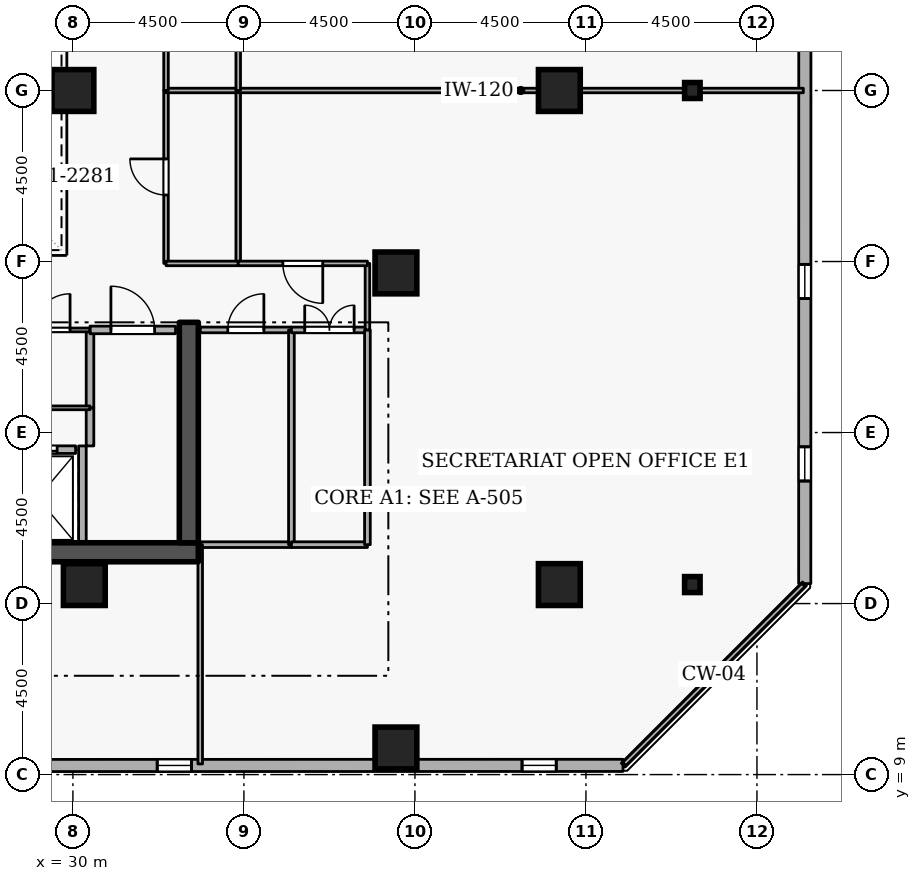
"""IFC4 building model, lengths in metres.
Left out: names, types, materials, properties, quantities, classifications, styles, units other than length and angle.
Written with IfcOpenShell. Run it as: python <this file> out.ifc"""

import sys

from ifc_helpers import new_model, si_unit, direction, frame, frame_2d, origin, origin_2d, place, context, subcontext, project, spatial, rectangle, i_section, extrude, element, fill, save


model = new_model("IFC4")
c1 = context("Model", 3, precision=1e-05, world=origin(), true_north=direction((0.0, 1.0)))
c2 = subcontext(c1, "Body", "Model", "MODEL_VIEW")
j1 = project(units=[si_unit("LENGTHUNIT", "METRE"), si_unit("PLANEANGLEUNIT", "RADIAN")], contexts=[c1])
p1 = place(None, origin())
s1 = spatial("IfcSite", under=j1, at=p1, CompositionType="ELEMENT")
p2 = place(p1, origin())
s2 = spatial("IfcBuilding", under=s1, at=p2, CompositionType="ELEMENT")
p3 = place(p2, frame((0.0, 0.0, 192.9)))
s3 = spatial("IfcBuildingStorey", under=s2, at=p3, CompositionType="ELEMENT", Elevation=192.9)
p4 = place(p3, frame((17.7, 14.85, 0.0), z_axis=(0.0, 0.0, 1.0), x_axis=(1.0, 0.0, 0.0)))
e1 = element("IfcWall", 1, at=p4, inside=s3, PredefinedType="SHEAR", context=c2, shape_type="SweptSolid", body=[
    extrude(rectangle(XDim=15.6, YDim=0.5, at=frame_2d((7.8, 0.0))), origin(), (0.0, 0.0, 1.0), 3.6),
])
p5 = place(p3, frame((33.05, 15.1, 0.0), z_axis=(0.0, 0.0, 1.0), x_axis=(0.0, 1.0, 0.0)))
e2 = element("IfcWall", 2, at=p5, inside=s3, PredefinedType="SHEAR", context=c2, shape_type="SweptSolid", body=[
    extrude(rectangle(XDim=5.8, YDim=0.5, at=frame_2d((2.9, 0.0))), origin(), (0.0, 0.0, 1.0), 3.6),
])
for number, where, z_axis, x_axis in (
    (3, (38.5, 9.7, 0.0), (0.0, 0.0, 1.0), (1.0, 0.0, 0.0)),
    (4, (42.8, 14.0, 0.0), (0.0, 0.0, 1.0), (1.0, 0.0, 0.0)),
    (5, (42.8, 27.0, 0.0), (0.0, 0.0, 1.0), (1.0, 0.0, 0.0)),
    (6, (38.5, 22.2, 0.0), (0.0, 0.0, 1.0), (1.0, 0.0, 0.0)),
    (7, (30.3, 14.0, 0.0), (0.0, 0.0, 1.0), (1.0, 0.0, 0.0)),
    (8, (30.0, 27.0, 0.0), (0.0, 0.0, 1.0), (1.0, 0.0, 0.0)),
):
    element("IfcColumn", number, at=place(p3, frame(where, z_axis=z_axis, x_axis=x_axis)), inside=s3, PredefinedType="COLUMN", context=c2, shape_type="SweptSolid", body=[
        extrude(rectangle(XDim=1.1, YDim=1.1, at=origin_2d()), origin(), (0.0, 0.0, 1.0), 3.6),
    ])
for number, where, z_axis, x_axis in (
    (9, (46.3, 14.0, 0.0), (0.0, 0.0, 1.0), (1.0, 0.0, 0.0)),
    (10, (46.3, 27.0, 0.0), (0.0, 0.0, 1.0), (1.0, 0.0, 0.0)),
):
    element("IfcColumn", number, at=place(p3, frame(where, z_axis=z_axis, x_axis=x_axis)), inside=s3, PredefinedType="COLUMN", context=c2, shape_type="SweptSolid", body=[
        extrude(i_section(OverallWidth=0.407, OverallDepth=0.419, WebThickness=0.031, FlangeThickness=0.049, FilletRadius=0.015, at=origin_2d()), origin(), (0.0, 0.0, 1.0), 3.6),
    ])
p6 = place(p3, frame((10.319, 9.235, 0.0), z_axis=(0.0, 0.0, 1.0), x_axis=(0.99999997701, 0.000214431216, 0.0)))
e11 = element("IfcWall", 11, at=p6, inside=s3, PredefinedType="STANDARD", context=c2, shape_type="SweptSolid", body=[
    extrude(rectangle(XDim=34.156, YDim=0.32, at=frame_2d((17.078, 0.0))), origin(), (0.0, 0.0, 1.0), 2.7),
])
p7 = place(p6, frame((7.5, 0.0, 0.72)))
e12 = element("IfcOpeningElement", 12, at=p7, cuts=e11, PredefinedType="OPENING", context=c2, shape_type="SweptSolid", body=[
    extrude(rectangle(XDim=0.9, YDim=1.75, at=frame_2d((0.45, 0.875))), frame((0.0, 0.17, 0.0), z_axis=(0.0, -1.0, 0.0), x_axis=(1.0, 0.0, 0.0)), (0.0, 0.0, 1.0), 0.34),
])
p8 = place(p6, frame((12.3, 0.0, 0.72)))
e13 = element("IfcOpeningElement", 13, at=p8, cuts=e11, PredefinedType="OPENING", context=c2, shape_type="SweptSolid", body=[
    extrude(rectangle(XDim=0.9, YDim=1.75, at=frame_2d((0.45, 0.875))), frame((0.0, 0.17, 0.0), z_axis=(0.0, -1.0, 0.0), x_axis=(1.0, 0.0, 0.0)), (0.0, 0.0, 1.0), 0.34),
])
p9 = place(p6, frame((17.1, 0.0, 0.72)))
e14 = element("IfcOpeningElement", 14, at=p9, cuts=e11, PredefinedType="OPENING", context=c2, shape_type="SweptSolid", body=[
    extrude(rectangle(XDim=0.9, YDim=1.75, at=frame_2d((0.45, 0.875))), frame((0.0, 0.17, 0.0), z_axis=(0.0, -1.0, 0.0), x_axis=(1.0, 0.0, 0.0)), (0.0, 0.0, 1.0), 0.34),
])
p10 = place(p6, frame((21.9, 0.0, 0.72)))
e15 = element("IfcOpeningElement", 15, at=p10, cuts=e11, PredefinedType="OPENING", context=c2, shape_type="SweptSolid", body=[
    extrude(rectangle(XDim=0.9, YDim=1.75, at=frame_2d((0.45, 0.875))), frame((0.0, 0.17, 0.0), z_axis=(0.0, -1.0, 0.0), x_axis=(1.0, 0.0, 0.0)), (0.0, 0.0, 1.0), 0.34),
])
p11 = place(p6, frame((31.5, 0.0, 0.72)))
e16 = element("IfcOpeningElement", 16, at=p11, cuts=e11, PredefinedType="OPENING", context=c2, shape_type="SweptSolid", body=[
    extrude(rectangle(XDim=0.9, YDim=1.75, at=frame_2d((0.45, 0.875))), frame((0.0, 0.17, 0.0), z_axis=(0.0, -1.0, 0.0), x_axis=(1.0, 0.0, 0.0)), (0.0, 0.0, 1.0), 0.34),
])
p12 = place(p3, frame((49.257, 14.025, 0.0), z_axis=(0.0, 0.0, 1.0), x_axis=(0.000214431216, 0.99999997701, 0.0)))
e17 = element("IfcWall", 17, at=p12, inside=s3, PredefinedType="STANDARD", context=c2, shape_type="SweptSolid", body=[
    extrude(rectangle(XDim=34.156, YDim=0.32, at=frame_2d((17.078, 0.0))), origin(), (0.0, 0.0, 1.0), 2.7),
])
p13 = place(p12, frame((2.7, 0.0, 0.72)))
e18 = element("IfcOpeningElement", 18, at=p13, cuts=e17, PredefinedType="OPENING", context=c2, shape_type="SweptSolid", body=[
    extrude(rectangle(XDim=0.9, YDim=1.75, at=frame_2d((0.45, 0.875))), frame((0.0, 0.17, 0.0), z_axis=(0.0, -1.0, 0.0), x_axis=(1.0, 0.0, 0.0)), (0.0, 0.0, 1.0), 0.34),
])
p14 = place(p12, frame((7.5, 0.0, 0.72)))
e19 = element("IfcOpeningElement", 19, at=p14, cuts=e17, PredefinedType="OPENING", context=c2, shape_type="SweptSolid", body=[
    extrude(rectangle(XDim=0.9, YDim=1.75, at=frame_2d((0.45, 0.875))), frame((0.0, 0.17, 0.0), z_axis=(0.0, -1.0, 0.0), x_axis=(1.0, 0.0, 0.0)), (0.0, 0.0, 1.0), 0.34),
])
p15 = place(p12, frame((17.1, 0.0, 0.72)))
e20 = element("IfcOpeningElement", 20, at=p15, cuts=e17, PredefinedType="OPENING", context=c2, shape_type="SweptSolid", body=[
    extrude(rectangle(XDim=0.9, YDim=1.75, at=frame_2d((0.45, 0.875))), frame((0.0, 0.17, 0.0), z_axis=(0.0, -1.0, 0.0), x_axis=(1.0, 0.0, 0.0)), (0.0, 0.0, 1.0), 0.34),
])
p16 = place(p12, frame((21.9, 0.0, 0.72)))
e21 = element("IfcOpeningElement", 21, at=p16, cuts=e17, PredefinedType="OPENING", context=c2, shape_type="SweptSolid", body=[
    extrude(rectangle(XDim=0.9, YDim=1.75, at=frame_2d((0.45, 0.875))), frame((0.0, 0.17, 0.0), z_axis=(0.0, -1.0, 0.0), x_axis=(1.0, 0.0, 0.0)), (0.0, 0.0, 1.0), 0.34),
])
p17 = place(p12, frame((26.7, 0.0, 0.72)))
e22 = element("IfcOpeningElement", 22, at=p17, cuts=e17, PredefinedType="OPENING", context=c2, shape_type="SweptSolid", body=[
    extrude(rectangle(XDim=0.9, YDim=1.75, at=frame_2d((0.45, 0.875))), frame((0.0, 0.17, 0.0), z_axis=(0.0, -1.0, 0.0), x_axis=(1.0, 0.0, 0.0)), (0.0, 0.0, 1.0), 0.34),
])
p18 = place(p12, frame((31.5, 0.0, 0.72)))
e23 = element("IfcOpeningElement", 23, at=p18, cuts=e17, PredefinedType="OPENING", context=c2, shape_type="SweptSolid", body=[
    extrude(rectangle(XDim=0.9, YDim=1.75, at=frame_2d((0.45, 0.875))), frame((0.0, 0.17, 0.0), z_axis=(0.0, -1.0, 0.0), x_axis=(1.0, 0.0, 0.0)), (0.0, 0.0, 1.0), 0.34),
])
p19 = place(p3, frame((28.08, 17.55, 0.0), z_axis=(0.0, 0.0, 1.0), x_axis=(1.0, 0.0, 0.0)))
e24 = element("IfcWall", 24, at=p19, inside=s3, PredefinedType="STANDARD", context=c2, shape_type="SweptSolid", body=[
    extrude(rectangle(XDim=1.99, YDim=0.2, at=frame_2d((0.995, 0.0))), origin(), (0.0, 0.0, 1.0), 3.34),
])
p20 = place(p19, frame((0.485, 0.0, 0.0)))
e25 = element("IfcOpeningElement", 25, at=p20, cuts=e24, PredefinedType="OPENING", context=c2, shape_type="SweptSolid", body=[
    extrude(rectangle(XDim=1.02, YDim=2.06, at=frame_2d((0.51, 1.03))), frame((0.0, 0.11, 0.0), z_axis=(0.0, -1.0, 0.0), x_axis=(1.0, 0.0, 0.0)), (0.0, 0.0, 1.0), 0.22),
])
p21 = place(p3, frame((30.25, 15.112, 0.0), z_axis=(0.0, 0.0, 1.0), x_axis=(0.0, 1.0, 0.0)))
e26 = element("IfcWall", 26, at=p21, inside=s3, PredefinedType="STANDARD", context=c2, shape_type="SweptSolid", body=[
    extrude(rectangle(XDim=2.536, YDim=0.2, at=frame_2d((1.268, 0.0))), origin(), (0.0, 0.0, 1.0), 3.34),
])
p22 = place(p3, frame((30.45, 17.648, 0.0), z_axis=(0.0, 0.0, 1.0), x_axis=(0.0, 1.0, 0.0)))
e27 = element("IfcWall", 27, at=p22, inside=s3, PredefinedType="STANDARD", context=c2, shape_type="SweptSolid", body=[
    extrude(rectangle(XDim=1.002, YDim=0.2, at=frame_2d((0.501, 0.0))), origin(), (0.0, 0.0, 1.0), 3.34),
])
p23 = place(p3, frame((30.45, 18.65, 0.0), z_axis=(0.0, 0.0, 1.0), x_axis=(0.0, 1.0, 0.0)))
e28 = element("IfcWall", 28, at=p23, inside=s3, PredefinedType="STANDARD", context=c2, shape_type="SweptSolid", body=[
    extrude(rectangle(XDim=2.05, YDim=0.2, at=frame_2d((1.025, 0.0))), origin(), (0.0, 0.0, 1.0), 3.34),
])
p24 = place(p3, frame((30.45, 20.7, 0.0), z_axis=(0.0, 0.0, 1.0), x_axis=(1.0, 0.0, 0.0)))
e29 = element("IfcWall", 29, at=p24, inside=s3, PredefinedType="STANDARD", context=c2, shape_type="SweptSolid", body=[
    extrude(rectangle(XDim=2.25, YDim=0.2, at=frame_2d((1.125, 0.0))), origin(), (0.0, 0.0, 1.0), 3.34),
])
p25 = place(p24, frame((0.55, 0.0, 0.0)))
e30 = element("IfcOpeningElement", 30, at=p25, cuts=e29, PredefinedType="OPENING", context=c2, shape_type="SweptSolid", body=[
    extrude(rectangle(XDim=1.15, YDim=2.1, at=frame_2d((0.575, 1.05))), frame((0.0, 0.11, 0.0), z_axis=(0.0, -1.0, 0.0), x_axis=(1.0, 0.0, 0.0)), (0.0, 0.0, 1.0), 0.22),
])
p26 = place(p3, frame((30.45, 18.65, 0.0), z_axis=(0.0, 0.0, 1.0), x_axis=(-1.0, 0.0, 0.0)))
e31 = element("IfcWall", 31, at=p26, inside=s3, PredefinedType="PARTITIONING", context=c2, shape_type="SweptSolid", body=[
    extrude(rectangle(XDim=2.0, YDim=0.1, at=frame_2d((1.0, 0.0))), origin(), (0.0, 0.0, 1.0), 3.34),
])
p27 = place(p3, frame((28.45, 20.7, 0.0), z_axis=(0.0, 0.0, 1.0), x_axis=(1.0, 0.0, 0.0)))
e32 = element("IfcWall", 32, at=p27, inside=s3, PredefinedType="PARTITIONING", context=c2, shape_type="SweptSolid", body=[
    extrude(rectangle(XDim=2.0, YDim=0.1, at=frame_2d((1.0, 0.0))), origin(), (0.0, 0.0, 1.0), 3.34),
])
p28 = place(p27, frame((0.525, 0.0, 0.0)))
e33 = element("IfcOpeningElement", 33, at=p28, cuts=e32, PredefinedType="OPENING", context=c2, shape_type="SweptSolid", body=[
    extrude(rectangle(XDim=0.95, YDim=2.1, at=frame_2d((0.475, 1.05))), frame((0.0, 0.06, 0.0), z_axis=(0.0, -1.0, 0.0), x_axis=(1.0, 0.0, 0.0)), (0.0, 0.0, 1.0), 0.12),
])
p29 = place(p3, frame((35.75, 15.05, 0.0), z_axis=(0.0, 0.0, 1.0), x_axis=(-1.0, 0.0, 0.0)))
e34 = element("IfcWall", 34, at=p29, inside=s3, PredefinedType="PARTITIONING", context=c2, shape_type="SweptSolid", body=[
    extrude(rectangle(XDim=2.4, YDim=0.15, at=frame_2d((1.2, 0.0))), origin(), (0.0, 0.0, 1.0), 3.34),
])
p30 = place(p3, frame((33.35, 20.7, 0.0), z_axis=(0.0, 0.0, 1.0), x_axis=(1.0, 0.0, 0.0)))
e35 = element("IfcWall", 35, at=p30, inside=s3, PredefinedType="PARTITIONING", context=c2, shape_type="SweptSolid", body=[
    extrude(rectangle(XDim=2.4, YDim=0.15, at=frame_2d((1.2, 0.0))), origin(), (0.0, 0.0, 1.0), 3.34),
])
p31 = place(p30, frame((0.725, 0.0, 0.0)))
e36 = element("IfcOpeningElement", 36, at=p31, cuts=e35, PredefinedType="OPENING", context=c2, shape_type="SweptSolid", body=[
    extrude(rectangle(XDim=0.95, YDim=2.1, at=frame_2d((0.475, 1.05))), frame((0.0, 0.085, 0.0), z_axis=(0.0, -1.0, 0.0), x_axis=(1.0, 0.0, 0.0)), (0.0, 0.0, 1.0), 0.17),
])
p32 = place(p3, frame((35.75, 20.7, 0.0), z_axis=(0.0, 0.0, 1.0), x_axis=(0.0, -1.0, 0.0)))
e37 = element("IfcWall", 37, at=p32, inside=s3, PredefinedType="PARTITIONING", context=c2, shape_type="SweptSolid", body=[
    extrude(rectangle(XDim=5.65, YDim=0.15, at=frame_2d((2.825, 0.0))), origin(), (0.0, 0.0, 1.0), 3.34),
])
p33 = place(p3, frame((37.75, 15.05, 0.0), z_axis=(0.0, 0.0, 1.0), x_axis=(-1.0, 0.0, 0.0)))
e38 = element("IfcWall", 38, at=p33, inside=s3, PredefinedType="PARTITIONING", context=c2, shape_type="SweptSolid", body=[
    extrude(rectangle(XDim=2.0, YDim=0.15, at=frame_2d((1.0, 0.0))), origin(), (0.0, 0.0, 1.0), 3.34),
])
p34 = place(p3, frame((35.75, 20.7, 0.0), z_axis=(0.0, 0.0, 1.0), x_axis=(1.0, 0.0, 0.0)))
e39 = element("IfcWall", 39, at=p34, inside=s3, PredefinedType="PARTITIONING", context=c2, shape_type="SweptSolid", body=[
    extrude(rectangle(XDim=2.0, YDim=0.15, at=frame_2d((1.0, 0.0))), origin(), (0.0, 0.0, 1.0), 3.34),
])
p35 = place(p34, frame((0.35, 0.0, 0.0)))
e40 = element("IfcOpeningElement", 40, at=p35, cuts=e39, PredefinedType="OPENING", context=c2, shape_type="SweptSolid", body=[
    extrude(rectangle(XDim=1.3, YDim=2.12, at=frame_2d((0.65, 1.06))), frame((0.0, 0.085, 0.0), z_axis=(0.0, -1.0, 0.0), x_axis=(1.0, 0.0, 0.0)), (0.0, 0.0, 1.0), 0.17),
])
p36 = place(p3, frame((37.75, 20.7, 0.0), z_axis=(0.0, 0.0, 1.0), x_axis=(0.0, -1.0, 0.0)))
e41 = element("IfcWall", 41, at=p36, inside=s3, PredefinedType="PARTITIONING", context=c2, shape_type="SweptSolid", body=[
    extrude(rectangle(XDim=5.65, YDim=0.15, at=frame_2d((2.825, 0.0))), origin(), (0.0, 0.0, 1.0), 3.34),
])
p37 = place(p3, frame((32.45, 22.45, 0.0), z_axis=(0.0, 0.0, 1.0), x_axis=(0.0, 1.0, 0.0)))
e42 = element("IfcWall", 42, at=p37, inside=s3, PredefinedType="PARTITIONING", context=c2, shape_type="SweptSolid", body=[
    extrude(rectangle(XDim=4.55, YDim=0.12, at=frame_2d((2.275, 0.0))), origin(), (0.0, 0.0, 1.0), 3.34),
])
p38 = place(p37, frame((1.8, 0.0, 0.0)))
e43 = element("IfcOpeningElement", 43, at=p38, cuts=e42, PredefinedType="OPENING", context=c2, shape_type="SweptSolid", body=[
    extrude(rectangle(XDim=0.95, YDim=2.1, at=frame_2d((0.475, 1.05))), frame((0.0, 0.07, 0.0), z_axis=(0.0, -1.0, 0.0), x_axis=(1.0, 0.0, 0.0)), (0.0, 0.0, 1.0), 0.14),
])
p39 = place(p3, frame((32.45, 27.0, 0.0), z_axis=(0.0, 0.0, 1.0), x_axis=(1.0, 0.0, 0.0)))
e44 = element("IfcWall", 44, at=p39, inside=s3, PredefinedType="PARTITIONING", context=c2, shape_type="SweptSolid", body=[
    extrude(rectangle(XDim=1.9, YDim=0.12, at=frame_2d((0.95, 0.0))), origin(), (0.0, 0.0, 1.0), 3.34),
])
p40 = place(p3, frame((34.35, 27.0, 0.0), z_axis=(0.0, 0.0, 1.0), x_axis=(0.0, -1.0, 0.0)))
e45 = element("IfcWall", 45, at=p40, inside=s3, PredefinedType="PARTITIONING", context=c2, shape_type="SweptSolid", body=[
    extrude(rectangle(XDim=4.55, YDim=0.12, at=frame_2d((2.275, 0.0))), origin(), (0.0, 0.0, 1.0), 3.34),
])
p41 = place(p3, frame((34.35, 22.45, 0.0), z_axis=(0.0, 0.0, 1.0), x_axis=(-1.0, 0.0, 0.0)))
e46 = element("IfcWall", 46, at=p41, inside=s3, PredefinedType="PARTITIONING", context=c2, shape_type="SweptSolid", body=[
    extrude(rectangle(XDim=1.9, YDim=0.12, at=frame_2d((0.95, 0.0))), origin(), (0.0, 0.0, 1.0), 3.34),
])
p42 = place(p3, frame((37.75, 20.7, 0.0), z_axis=(0.0, 0.0, 1.0), x_axis=(0.0, 1.0, 0.0)))
e47 = element("IfcWall", 47, at=p42, inside=s3, PredefinedType="PARTITIONING", context=c2, shape_type="SweptSolid", body=[
    extrude(rectangle(XDim=1.75, YDim=0.12, at=frame_2d((0.875, 0.0))), origin(), (0.0, 0.0, 1.0), 3.34),
])
p43 = place(p3, frame((37.75, 22.45, 0.0), z_axis=(0.0, 0.0, 1.0), x_axis=(-1.0, 0.0, 0.0)))
e48 = element("IfcWall", 48, at=p43, inside=s3, PredefinedType="PARTITIONING", context=c2, shape_type="SweptSolid", body=[
    extrude(rectangle(XDim=3.4, YDim=0.12, at=frame_2d((1.7, 0.0))), origin(), (0.0, 0.0, 1.0), 3.34),
])
p44 = place(p43, frame((1.175, 0.0, 0.0)))
e49 = element("IfcOpeningElement", 49, at=p44, cuts=e48, PredefinedType="OPENING", context=c2, shape_type="SweptSolid", body=[
    extrude(rectangle(XDim=1.05, YDim=2.1, at=frame_2d((0.525, 1.05))), frame((0.0, 0.07, 0.0), z_axis=(0.0, -1.0, 0.0), x_axis=(1.0, 0.0, 0.0)), (0.0, 0.0, 1.0), 0.14),
])
p45 = place(p3, frame((34.35, 27.0, 0.0), z_axis=(0.0, 0.0, 1.0), x_axis=(1.0, 0.0, 0.0)))
e50 = element("IfcWall", 50, at=p45, inside=s3, PredefinedType="PARTITIONING", context=c2, shape_type="SweptSolid", body=[
    extrude(rectangle(XDim=14.87, YDim=0.12, at=frame_2d((7.435, 0.0))), origin(), (0.0, 0.0, 1.0), 2.882),
])
p46 = place(p3, frame((49.22, 13.99, 0.0), z_axis=(0.0, 0.0, 1.0), x_axis=(-0.707106781187, -0.707106781187, 0.0)))
e51 = element("IfcWall", 51, at=p46, inside=s3, PredefinedType="PARTITIONING", context=c2, shape_type="SweptSolid", body=[
    extrude(rectangle(XDim=6.66, YDim=0.12, at=frame_2d((3.33, 0.0))), origin(), (0.0, 0.0, 1.0), 3.34),
])
p47 = place(p3, frame((33.35, 9.28, 0.0), z_axis=(0.0, 0.0, 1.0), x_axis=(0.0, 1.0, 0.0)))
e52 = element("IfcWall", 52, at=p47, inside=s3, PredefinedType="PARTITIONING", context=c2, shape_type="SweptSolid", body=[
    extrude(rectangle(XDim=5.77, YDim=0.12, at=frame_2d((2.885, 0.0))), origin(), (0.0, 0.0, 1.0), 2.545),
])
p48 = place(p3, frame((32.45, 27.0, 0.0), z_axis=(0.0, 0.0, 1.0), x_axis=(0.0, 1.0, 0.0)))
e53 = element("IfcWall", 53, at=p48, inside=s3, PredefinedType="PARTITIONING", context=c2, shape_type="SweptSolid", body=[
    extrude(rectangle(XDim=4.55, YDim=0.12, at=frame_2d((2.275, 0.0))), origin(), (0.0, 0.0, 1.0), 3.34),
])
p49 = place(p48, frame((1.8, 0.0, 0.0)))
e54 = element("IfcOpeningElement", 54, at=p49, cuts=e53, PredefinedType="OPENING", context=c2, shape_type="SweptSolid", body=[
    extrude(rectangle(XDim=0.95, YDim=2.1, at=frame_2d((0.475, 1.05))), frame((0.0, 0.07, 0.0), z_axis=(0.0, -1.0, 0.0), x_axis=(1.0, 0.0, 0.0)), (0.0, 0.0, 1.0), 0.14),
])
p50 = place(p3, frame((34.35, 31.55, 0.0), z_axis=(0.0, 0.0, 1.0), x_axis=(0.0, -1.0, 0.0)))
e55 = element("IfcWall", 55, at=p50, inside=s3, PredefinedType="PARTITIONING", context=c2, shape_type="SweptSolid", body=[
    extrude(rectangle(XDim=4.55, YDim=0.12, at=frame_2d((2.275, 0.0))), origin(), (0.0, 0.0, 1.0), 3.34),
])
p51 = place(p10, origin())
e56 = element("IfcWindow", 56, at=p51, inside=s3, PartitioningType="SINGLE_PANEL", PredefinedType="WINDOW", context=c2, shape_type="SweptSolid", body=[
    extrude(rectangle(XDim=0.9, YDim=1.75, at=frame_2d((0.45, 0.875))), frame((0.0, 0.03, 0.0), z_axis=(0.0, -1.0, 0.0), x_axis=(1.0, 0.0, 0.0)), (0.0, 0.0, 1.0), 0.06),
])
fill(e15, e56)
p52 = place(p11, origin())
e57 = element("IfcWindow", 57, at=p52, inside=s3, PartitioningType="SINGLE_PANEL", PredefinedType="WINDOW", context=c2, shape_type="SweptSolid", body=[
    extrude(rectangle(XDim=0.9, YDim=1.75, at=frame_2d((0.45, 0.875))), frame((0.0, 0.03, 0.0), z_axis=(0.0, -1.0, 0.0), x_axis=(1.0, 0.0, 0.0)), (0.0, 0.0, 1.0), 0.06),
])
fill(e16, e57)
p53 = place(p13, origin())
e58 = element("IfcWindow", 58, at=p53, inside=s3, PartitioningType="SINGLE_PANEL", PredefinedType="WINDOW", context=c2, shape_type="SweptSolid", body=[
    extrude(rectangle(XDim=0.9, YDim=1.75, at=frame_2d((0.45, 0.875))), frame((0.0, 0.03, 0.0), z_axis=(0.0, -1.0, 0.0), x_axis=(1.0, 0.0, 0.0)), (0.0, 0.0, 1.0), 0.06),
])
fill(e18, e58)
p54 = place(p14, origin())
e59 = element("IfcWindow", 59, at=p54, inside=s3, PartitioningType="SINGLE_PANEL", PredefinedType="WINDOW", context=c2, shape_type="SweptSolid", body=[
    extrude(rectangle(XDim=0.9, YDim=1.75, at=frame_2d((0.45, 0.875))), frame((0.0, 0.03, 0.0), z_axis=(0.0, -1.0, 0.0), x_axis=(1.0, 0.0, 0.0)), (0.0, 0.0, 1.0), 0.06),
])
fill(e19, e59)
p55 = place(p20, origin())
e60 = element("IfcDoor", 60, at=p55, inside=s3, OperationType="SLIDING_TO_LEFT", PredefinedType="DOOR", context=c2, shape_type="SweptSolid", body=[
    extrude(rectangle(XDim=1.02, YDim=2.06, at=frame_2d((0.51, 1.03))), frame((0.0, 0.025, 0.0), z_axis=(0.0, -1.0, 0.0), x_axis=(1.0, 0.0, 0.0)), (0.0, 0.0, 1.0), 0.05),
])
fill(e25, e60)
p56 = place(p28, origin())
e61 = element("IfcDoor", 61, at=p56, inside=s3, OperationType="SINGLE_SWING_RIGHT", PredefinedType="DOOR", context=c2, shape_type="SweptSolid", body=[
    extrude(rectangle(XDim=0.95, YDim=2.1, at=frame_2d((0.475, 1.05))), frame((0.0, 0.025, 0.0), z_axis=(0.0, -1.0, 0.0), x_axis=(1.0, 0.0, 0.0)), (0.0, 0.0, 1.0), 0.05),
])
fill(e33, e61)
p57 = place(p25, origin())
e62 = element("IfcDoor", 62, at=p57, inside=s3, OperationType="SINGLE_SWING_LEFT", PredefinedType="DOOR", context=c2, shape_type="SweptSolid", body=[
    extrude(rectangle(XDim=1.15, YDim=2.1, at=frame_2d((0.575, 1.05))), frame((0.0, 0.025, 0.0), z_axis=(0.0, -1.0, 0.0), x_axis=(1.0, 0.0, 0.0)), (0.0, 0.0, 1.0), 0.05),
])
fill(e30, e62)
p58 = place(p31, origin())
e63 = element("IfcDoor", 63, at=p58, inside=s3, OperationType="SINGLE_SWING_RIGHT", PredefinedType="DOOR", context=c2, shape_type="SweptSolid", body=[
    extrude(rectangle(XDim=0.95, YDim=2.1, at=frame_2d((0.475, 1.05))), frame((0.0, 0.025, 0.0), z_axis=(0.0, -1.0, 0.0), x_axis=(1.0, 0.0, 0.0)), (0.0, 0.0, 1.0), 0.05),
])
fill(e36, e63)
p59 = place(p35, origin())
e64 = element("IfcDoor", 64, at=p59, inside=s3, OperationType="DOUBLE_DOOR_SINGLE_SWING", PredefinedType="DOOR", context=c2, shape_type="SweptSolid", body=[
    extrude(rectangle(XDim=1.3, YDim=2.12, at=frame_2d((0.65, 1.06))), frame((0.0, 0.025, 0.0), z_axis=(0.0, -1.0, 0.0), x_axis=(1.0, 0.0, 0.0)), (0.0, 0.0, 1.0), 0.05),
])
fill(e40, e64)
p60 = place(p38, origin())
e65 = element("IfcDoor", 65, at=p60, inside=s3, OperationType="SINGLE_SWING_RIGHT", PredefinedType="DOOR", context=c2, shape_type="SweptSolid", body=[
    extrude(rectangle(XDim=0.95, YDim=2.1, at=frame_2d((0.475, 1.05))), frame((0.0, 0.025, 0.0), z_axis=(0.0, -1.0, 0.0), x_axis=(1.0, 0.0, 0.0)), (0.0, 0.0, 1.0), 0.05),
])
fill(e43, e65)
p61 = place(p44, origin())
e66 = element("IfcDoor", 66, at=p61, inside=s3, OperationType="SINGLE_SWING_LEFT", PredefinedType="DOOR", context=c2, shape_type="SweptSolid", body=[
    extrude(rectangle(XDim=1.05, YDim=2.1, at=frame_2d((0.525, 1.05))), frame((0.0, 0.025, 0.0), z_axis=(0.0, -1.0, 0.0), x_axis=(1.0, 0.0, 0.0)), (0.0, 0.0, 1.0), 0.05),
])
fill(e49, e66)
save(model, sys.argv[1])
